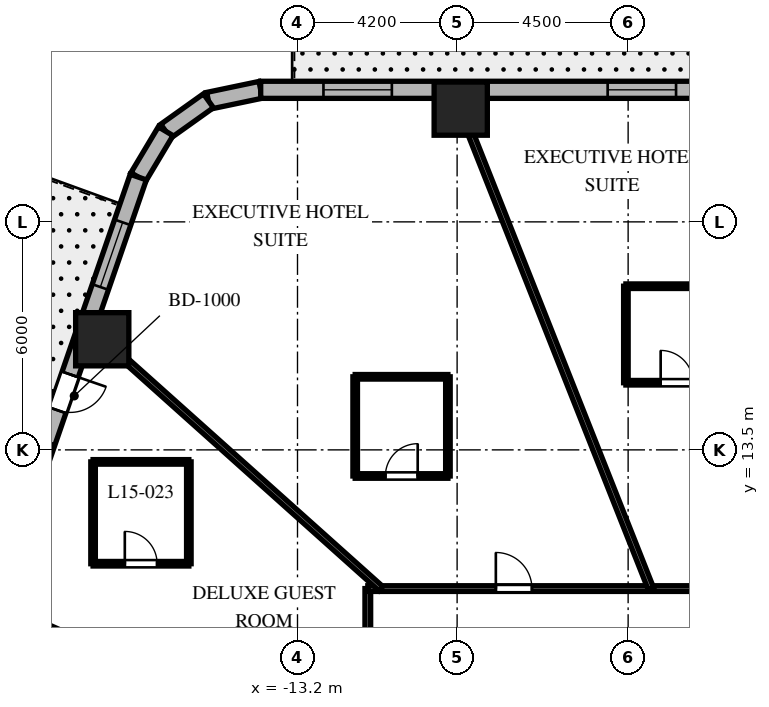
"""IFC4 building model, lengths in metres.
Left out: names, types, materials, properties, quantities, classifications, styles, units other than length and angle.
Written with IfcOpenShell. Run it as: python <this file> out.ifc"""

import sys

from ifc_helpers import new_model, si_unit, direction, frame, frame_2d, origin, origin_2d, place, context, subcontext, project, spatial, rectangle, extrude, element, fill, save


model = new_model("IFC4")
c1 = context("Model", 3, precision=1e-05, world=origin(), true_north=direction((0.0, 1.0)))
c2 = subcontext(c1, "Body", "Model", "MODEL_VIEW")
j1 = project(units=[si_unit("LENGTHUNIT", "METRE"), si_unit("PLANEANGLEUNIT", "RADIAN")], contexts=[c1])
p1 = place(None, origin())
s1 = spatial("IfcSite", under=j1, at=p1, CompositionType="ELEMENT")
p2 = place(p1, origin())
s2 = spatial("IfcBuilding", under=s1, at=p2, CompositionType="ELEMENT")
p3 = place(p2, frame((0.0, 0.0, 67.5)))
s3 = spatial("IfcBuildingStorey", under=s2, at=p3, CompositionType="ELEMENT", Elevation=67.5)
for number, where, z_axis, x_axis in (
    (1, (-8.905, 22.48, 0.0), (0.0, 0.0, 1.0), (1.0, 0.0, 0.0)),
    (2, (-18.338, 16.411, 0.0), (0.0, 0.0, 1.0), (1.0, 0.0, 0.0)),
):
    element("IfcColumn", number, at=place(p3, frame(where, z_axis=z_axis, x_axis=x_axis)), inside=s3, PredefinedType="COLUMN", context=c2, shape_type="SweptSolid", body=[
        extrude(rectangle(XDim=1.4, YDim=1.4, at=origin_2d()), origin(), (0.0, 0.0, 1.0), 3.7),
    ])
p4 = place(p3, frame((-14.168, 22.975, 0.0), z_axis=(0.0, 0.0, 1.0), x_axis=(-0.978770371074, -0.204959900243, 0.0)))
e3 = element("IfcWall", 3, at=p4, inside=s3, PredefinedType="SOLIDWALL", context=c2, shape_type="SweptSolid", body=[
    extrude(rectangle(XDim=1.406, YDim=0.45, at=frame_2d((0.703, 0.0))), origin(), (0.0, 0.0, 1.0), 3.4),
])
p5 = place(p3, frame((-15.544, 22.687, 0.0), z_axis=(0.0, 0.0, 1.0), x_axis=(-0.814210854316, -0.580569276412, 0.0)))
e4 = element("IfcWall", 4, at=p5, inside=s3, PredefinedType="SOLIDWALL", context=c2, shape_type="SweptSolid", body=[
    extrude(rectangle(XDim=1.381, YDim=0.45, at=frame_2d((0.691, 0.0))), origin(), (0.0, 0.0, 1.0), 3.4),
])
p6 = place(p3, frame((-16.669, 21.885, 0.0), z_axis=(0.0, 0.0, 1.0), x_axis=(-0.512936712947, -0.858426425799, 0.0)))
e5 = element("IfcWall", 5, at=p6, inside=s3, PredefinedType="SOLIDWALL", context=c2, shape_type="SweptSolid", body=[
    extrude(rectangle(XDim=1.406, YDim=0.45, at=frame_2d((0.703, 0.0))), origin(), (0.0, 0.0, 1.0), 3.4),
])
p7 = place(p3, frame((12.221, 22.975, 0.0), z_axis=(0.0, 0.0, 1.0), x_axis=(-1.0, 0.0, 0.0)))
e6 = element("IfcWall", 6, at=p7, inside=s3, PredefinedType="SOLIDWALL", context=c2, shape_type="SweptSolid", body=[
    extrude(rectangle(XDim=26.389, YDim=0.45, at=frame_2d((13.195, 0.0))), origin(), (0.0, 0.0, 1.0), 3.4),
])
p8 = place(p7, frame((2.799, 0.0, 0.0)))
e7 = element("IfcOpeningElement", 7, at=p8, cuts=e6, PredefinedType="OPENING", context=c2, shape_type="SweptSolid", body=[
    extrude(rectangle(XDim=0.95, YDim=2.15, at=frame_2d((0.475, 1.075))), frame((0.0, 0.235, 0.0), z_axis=(0.0, -1.0, 0.0), x_axis=(1.0, 0.0, 0.0)), (0.0, 0.0, 1.0), 0.47),
])
p9 = place(p7, frame((8.11, 0.0, 0.8)))
e8 = element("IfcOpeningElement", 8, at=p9, cuts=e6, PredefinedType="OPENING", context=c2, shape_type="SweptSolid", body=[
    extrude(rectangle(XDim=1.8, YDim=1.8, at=frame_2d((0.9, 0.9))), frame((0.0, 0.235, 0.0), z_axis=(0.0, -1.0, 0.0), x_axis=(1.0, 0.0, 0.0)), (0.0, 0.0, 1.0), 0.47),
])
p10 = place(p7, frame((15.46, 0.0, 0.8)))
e9 = element("IfcOpeningElement", 9, at=p10, cuts=e6, PredefinedType="OPENING", context=c2, shape_type="SweptSolid", body=[
    extrude(rectangle(XDim=1.8, YDim=1.8, at=frame_2d((0.9, 0.9))), frame((0.0, 0.235, 0.0), z_axis=(0.0, -1.0, 0.0), x_axis=(1.0, 0.0, 0.0)), (0.0, 0.0, 1.0), 0.47),
])
p11 = place(p7, frame((22.938, 0.0, 0.8)))
e10 = element("IfcOpeningElement", 10, at=p11, cuts=e6, PredefinedType="OPENING", context=c2, shape_type="SweptSolid", body=[
    extrude(rectangle(XDim=1.8, YDim=1.8, at=frame_2d((0.9, 0.9))), frame((0.0, 0.235, 0.0), z_axis=(0.0, -1.0, 0.0), x_axis=(1.0, 0.0, 0.0)), (0.0, 0.0, 1.0), 0.47),
])
p12 = place(p3, frame((-17.39, 20.678, 0.0), z_axis=(0.0, 0.0, 1.0), x_axis=(-0.326068018294, -0.945346310854, 0.0)))
e11 = element("IfcWall", 11, at=p12, inside=s3, PredefinedType="SOLIDWALL", context=c2, shape_type="SweptSolid", body=[
    extrude(rectangle(XDim=21.793, YDim=0.45, at=frame_2d((10.896, 0.0))), origin(), (0.0, 0.0, 1.0), 3.4),
])
p13 = place(p12, frame((5.493, 0.0, 0.0)))
e12 = element("IfcOpeningElement", 12, at=p13, cuts=e11, PredefinedType="OPENING", context=c2, shape_type="SweptSolid", body=[
    extrude(rectangle(XDim=1.0, YDim=2.15, at=frame_2d((0.5, 1.075))), frame((0.0, 0.235, 0.0), z_axis=(0.0, -1.0, 0.0), x_axis=(1.0, 0.0, 0.0)), (0.0, 0.0, 1.0), 0.47),
])
p14 = place(p12, frame((1.26, 0.0, 0.8)))
e13 = element("IfcOpeningElement", 13, at=p14, cuts=e11, PredefinedType="OPENING", context=c2, shape_type="SweptSolid", body=[
    extrude(rectangle(XDim=1.8, YDim=1.8, at=frame_2d((0.9, 0.9))), frame((0.0, 0.235, 0.0), z_axis=(0.0, -1.0, 0.0), x_axis=(1.0, 0.0, 0.0)), (0.0, 0.0, 1.0), 0.47),
])
p15 = place(p12, frame((7.363, 0.0, 0.8)))
e14 = element("IfcOpeningElement", 14, at=p15, cuts=e11, PredefinedType="OPENING", context=c2, shape_type="SweptSolid", body=[
    extrude(rectangle(XDim=1.8, YDim=1.8, at=frame_2d((0.9, 0.9))), frame((0.0, 0.235, 0.0), z_axis=(0.0, -1.0, 0.0), x_axis=(1.0, 0.0, 0.0)), (0.0, 0.0, 1.0), 0.47),
])
p16 = place(p12, frame((13.518, 0.0, 0.8)))
e15 = element("IfcOpeningElement", 15, at=p16, cuts=e11, PredefinedType="OPENING", context=c2, shape_type="SweptSolid", body=[
    extrude(rectangle(XDim=1.8, YDim=1.8, at=frame_2d((0.9, 0.9))), frame((0.0, 0.235, 0.0), z_axis=(0.0, -1.0, 0.0), x_axis=(1.0, 0.0, 0.0)), (0.0, 0.0, 1.0), 0.47),
])
p17 = place(p12, frame((18.68, 0.0, 0.8)))
e16 = element("IfcOpeningElement", 16, at=p17, cuts=e11, PredefinedType="OPENING", context=c2, shape_type="SweptSolid", body=[
    extrude(rectangle(XDim=1.8, YDim=1.8, at=frame_2d((0.9, 0.9))), frame((0.0, 0.235, 0.0), z_axis=(0.0, -1.0, 0.0), x_axis=(1.0, 0.0, 0.0)), (0.0, 0.0, 1.0), 0.47),
])
p18 = place(p3, frame((-11.35, -9.85, 0.0), z_axis=(0.0, 0.0, 1.0), x_axis=(0.0, 1.0, 0.0)))
e17 = element("IfcWall", 17, at=p18, inside=s3, PredefinedType="PARTITIONING", context=c2, shape_type="SweptSolid", body=[
    extrude(rectangle(XDim=19.7, YDim=0.15, at=frame_2d((9.85, 0.0))), origin(), (0.0, 0.0, 1.0), 2.84),
])
p19 = place(p18, frame((16.714, 0.0, 0.0)))
e18 = element("IfcOpeningElement", 18, at=p19, cuts=e17, PredefinedType="OPENING", context=c2, shape_type="SweptSolid", body=[
    extrude(rectangle(XDim=0.95, YDim=2.03, at=frame_2d((0.475, 1.015))), frame((0.0, 0.085, 0.0), z_axis=(0.0, -1.0, 0.0), x_axis=(1.0, 0.0, 0.0)), (0.0, 0.0, 1.0), 0.17),
])
p20 = place(p18, frame((12.932, 0.0, 0.0)))
e19 = element("IfcOpeningElement", 19, at=p20, cuts=e17, PredefinedType="OPENING", context=c2, shape_type="SweptSolid", body=[
    extrude(rectangle(XDim=0.95, YDim=2.03, at=frame_2d((0.475, 1.015))), frame((0.0, 0.085, 0.0), z_axis=(0.0, -1.0, 0.0), x_axis=(1.0, 0.0, 0.0)), (0.0, 0.0, 1.0), 0.17),
])
p21 = place(p18, frame((8.838, 0.0, 0.0)))
e20 = element("IfcOpeningElement", 20, at=p21, cuts=e17, PredefinedType="OPENING", context=c2, shape_type="SweptSolid", body=[
    extrude(rectangle(XDim=0.95, YDim=2.03, at=frame_2d((0.475, 1.015))), frame((0.0, 0.085, 0.0), z_axis=(0.0, -1.0, 0.0), x_axis=(1.0, 0.0, 0.0)), (0.0, 0.0, 1.0), 0.17),
])
p22 = place(p18, frame((3.024, 0.0, 0.0)))
e21 = element("IfcOpeningElement", 21, at=p22, cuts=e17, PredefinedType="OPENING", context=c2, shape_type="SweptSolid", body=[
    extrude(rectangle(XDim=0.95, YDim=2.03, at=frame_2d((0.475, 1.015))), frame((0.0, 0.085, 0.0), z_axis=(0.0, -1.0, 0.0), x_axis=(1.0, 0.0, 0.0)), (0.0, 0.0, 1.0), 0.17),
])
p23 = place(p3, frame((-11.35, 9.85, 0.0), z_axis=(0.0, 0.0, 1.0), x_axis=(1.0, 0.0, 0.0)))
e22 = element("IfcWall", 22, at=p23, inside=s3, PredefinedType="PARTITIONING", context=c2, shape_type="SweptSolid", body=[
    extrude(rectangle(XDim=22.7, YDim=0.15, at=frame_2d((11.35, 0.0))), origin(), (0.0, 0.0, 1.0), 2.84),
])
p24 = place(p23, frame((17.225, 0.0, 0.0)))
e23 = element("IfcOpeningElement", 23, at=p24, cuts=e22, PredefinedType="OPENING", context=c2, shape_type="SweptSolid", body=[
    extrude(rectangle(XDim=0.95, YDim=2.03, at=frame_2d((0.475, 1.015))), frame((0.0, 0.085, 0.0), z_axis=(0.0, -1.0, 0.0), x_axis=(1.0, 0.0, 0.0)), (0.0, 0.0, 1.0), 0.17),
])
p25 = place(p23, frame((12.415, 0.0, 0.0)))
e24 = element("IfcOpeningElement", 24, at=p25, cuts=e22, PredefinedType="OPENING", context=c2, shape_type="SweptSolid", body=[
    extrude(rectangle(XDim=0.95, YDim=2.03, at=frame_2d((0.475, 1.015))), frame((0.0, 0.085, 0.0), z_axis=(0.0, -1.0, 0.0), x_axis=(1.0, 0.0, 0.0)), (0.0, 0.0, 1.0), 0.17),
])
p26 = place(p23, frame((8.925, 0.0, 0.0)))
e25 = element("IfcOpeningElement", 25, at=p26, cuts=e22, PredefinedType="OPENING", context=c2, shape_type="SweptSolid", body=[
    extrude(rectangle(XDim=0.95, YDim=2.03, at=frame_2d((0.475, 1.015))), frame((0.0, 0.085, 0.0), z_axis=(0.0, -1.0, 0.0), x_axis=(1.0, 0.0, 0.0)), (0.0, 0.0, 1.0), 0.17),
])
p27 = place(p23, frame((3.369, 0.0, 0.0)))
e26 = element("IfcOpeningElement", 26, at=p27, cuts=e22, PredefinedType="OPENING", context=c2, shape_type="SweptSolid", body=[
    extrude(rectangle(XDim=0.95, YDim=2.03, at=frame_2d((0.475, 1.015))), frame((0.0, 0.085, 0.0), z_axis=(0.0, -1.0, 0.0), x_axis=(1.0, 0.0, 0.0)), (0.0, 0.0, 1.0), 0.17),
])
p28 = place(p3, frame((-3.902, 9.85, 0.0), z_axis=(0.0, 0.0, 1.0), x_axis=(-0.36828765711, 0.929711891728, 0.0)))
e27 = element("IfcWall", 27, at=p28, inside=s3, PredefinedType="PARTITIONING", context=c2, shape_type="SweptSolid", body=[
    extrude(rectangle(XDim=14.117, YDim=0.15, at=frame_2d((7.059, 0.0))), origin(), (0.0, 0.0, 1.0), 2.54),
])
p29 = place(p3, frame((-11.007, 9.85, 0.0), z_axis=(0.0, 0.0, 1.0), x_axis=(-0.745177305978, 0.666866390407, 0.0)))
e28 = element("IfcWall", 28, at=p29, inside=s3, PredefinedType="PARTITIONING", context=c2, shape_type="SweptSolid", body=[
    extrude(rectangle(XDim=10.375, YDim=0.15, at=frame_2d((5.188, 0.0))), origin(), (0.0, 0.0, 1.0), 2.54),
])
p30 = place(p3, frame((-11.35, 5.068, 0.0), z_axis=(0.0, 0.0, 1.0), x_axis=(-0.913107192911, 0.407719577963, 0.0)))
e29 = element("IfcWall", 29, at=p30, inside=s3, PredefinedType="PARTITIONING", context=c2, shape_type="SweptSolid", body=[
    extrude(rectangle(XDim=10.841, YDim=0.15, at=frame_2d((5.421, 0.0))), origin(), (0.0, 0.0, 1.0), 2.54),
])
p31 = place(p3, frame((-4.559, 15.267, 0.0), z_axis=(0.0, 0.0, 1.0), x_axis=(1.0, 0.0, 0.0)))
e30 = element("IfcWall", 30, at=p31, inside=s3, PredefinedType="PARTITIONING", context=c2, shape_type="SweptSolid", body=[
    extrude(rectangle(XDim=2.68, YDim=0.12, at=frame_2d((1.34, 0.0))), origin(), (0.0, 0.0, 1.0), 3.4),
])
p32 = place(p31, frame((0.915, 0.0, 0.0)))
e31 = element("IfcOpeningElement", 31, at=p32, cuts=e30, PredefinedType="OPENING", context=c2, shape_type="SweptSolid", body=[
    extrude(rectangle(XDim=0.85, YDim=2.03, at=frame_2d((0.425, 1.015))), frame((0.0, 0.07, 0.0), z_axis=(0.0, -1.0, 0.0), x_axis=(1.0, 0.0, 0.0)), (0.0, 0.0, 1.0), 0.14),
])
p33 = place(p3, frame((-1.879, 17.807, 0.0), z_axis=(0.0, 0.0, 1.0), x_axis=(-1.0, 0.0, 0.0)))
e32 = element("IfcWall", 32, at=p33, inside=s3, PredefinedType="PARTITIONING", context=c2, shape_type="SweptSolid", body=[
    extrude(rectangle(XDim=2.68, YDim=0.12, at=frame_2d((1.34, 0.0))), origin(), (0.0, 0.0, 1.0), 2.84),
])
p34 = place(p3, frame((-4.559, 17.807, 0.0), z_axis=(0.0, 0.0, 1.0), x_axis=(0.0, -1.0, 0.0)))
e33 = element("IfcWall", 33, at=p34, inside=s3, PredefinedType="PARTITIONING", context=c2, shape_type="SweptSolid", body=[
    extrude(rectangle(XDim=2.54, YDim=0.12, at=frame_2d((1.27, 0.0))), origin(), (0.0, 0.0, 1.0), 2.84),
])
p35 = place(p3, frame((-11.682, 12.813, 0.0), z_axis=(0.0, 0.0, 1.0), x_axis=(1.0, 0.0, 0.0)))
e34 = element("IfcWall", 34, at=p35, inside=s3, PredefinedType="PARTITIONING", context=c2, shape_type="SweptSolid", body=[
    extrude(rectangle(XDim=2.44, YDim=0.12, at=frame_2d((1.22, 0.0))), origin(), (0.0, 0.0, 1.0), 2.972),
])
p36 = place(p35, frame((0.795, 0.0, 0.0)))
e35 = element("IfcOpeningElement", 35, at=p36, cuts=e34, PredefinedType="OPENING", context=c2, shape_type="SweptSolid", body=[
    extrude(rectangle(XDim=0.85, YDim=2.03, at=frame_2d((0.425, 1.015))), frame((0.0, 0.07, 0.0), z_axis=(0.0, -1.0, 0.0), x_axis=(1.0, 0.0, 0.0)), (0.0, 0.0, 1.0), 0.14),
])
p37 = place(p3, frame((-9.242, 12.813, 0.0), z_axis=(0.0, 0.0, 1.0), x_axis=(0.0, 1.0, 0.0)))
e36 = element("IfcWall", 36, at=p37, inside=s3, PredefinedType="PARTITIONING", context=c2, shape_type="SweptSolid", body=[
    extrude(rectangle(XDim=2.61, YDim=0.12, at=frame_2d((1.305, 0.0))), origin(), (0.0, 0.0, 1.0), 2.972),
])
p38 = place(p3, frame((-9.242, 15.423, 0.0), z_axis=(0.0, 0.0, 1.0), x_axis=(-1.0, 0.0, 0.0)))
e37 = element("IfcWall", 37, at=p38, inside=s3, PredefinedType="PARTITIONING", context=c2, shape_type="SweptSolid", body=[
    extrude(rectangle(XDim=2.44, YDim=0.12, at=frame_2d((1.22, 0.0))), origin(), (0.0, 0.0, 1.0), 3.4),
])
p39 = place(p3, frame((-11.682, 15.423, 0.0), z_axis=(0.0, 0.0, 1.0), x_axis=(0.0, -1.0, 0.0)))
e38 = element("IfcWall", 38, at=p39, inside=s3, PredefinedType="PARTITIONING", context=c2, shape_type="SweptSolid", body=[
    extrude(rectangle(XDim=2.61, YDim=0.12, at=frame_2d((1.305, 0.0))), origin(), (0.0, 0.0, 1.0), 3.4),
])
p40 = place(p3, frame((-18.579, 10.504, 0.0), z_axis=(0.0, 0.0, 1.0), x_axis=(1.0, 0.0, 0.0)))
e39 = element("IfcWall", 39, at=p40, inside=s3, PredefinedType="PARTITIONING", context=c2, shape_type="SweptSolid", body=[
    extrude(rectangle(XDim=2.52, YDim=0.12, at=frame_2d((1.26, 0.0))), origin(), (0.0, 0.0, 1.0), 2.972),
])
p41 = place(p40, frame((0.835, 0.0, 0.0)))
e40 = element("IfcOpeningElement", 40, at=p41, cuts=e39, PredefinedType="OPENING", context=c2, shape_type="SweptSolid", body=[
    extrude(rectangle(XDim=0.85, YDim=2.03, at=frame_2d((0.425, 1.015))), frame((0.0, 0.07, 0.0), z_axis=(0.0, -1.0, 0.0), x_axis=(1.0, 0.0, 0.0)), (0.0, 0.0, 1.0), 0.14),
])
p42 = place(p3, frame((-16.059, 10.504, 0.0), z_axis=(0.0, 0.0, 1.0), x_axis=(0.0, 1.0, 0.0)))
e41 = element("IfcWall", 41, at=p42, inside=s3, PredefinedType="PARTITIONING", context=c2, shape_type="SweptSolid", body=[
    extrude(rectangle(XDim=2.68, YDim=0.12, at=frame_2d((1.34, 0.0))), origin(), (0.0, 0.0, 1.0), 2.972),
])
p43 = place(p3, frame((-16.059, 13.184, 0.0), z_axis=(0.0, 0.0, 1.0), x_axis=(-1.0, 0.0, 0.0)))
e42 = element("IfcWall", 42, at=p43, inside=s3, PredefinedType="PARTITIONING", context=c2, shape_type="SweptSolid", body=[
    extrude(rectangle(XDim=2.52, YDim=0.12, at=frame_2d((1.26, 0.0))), origin(), (0.0, 0.0, 1.0), 3.4),
])
p44 = place(p3, frame((-18.579, 13.184, 0.0), z_axis=(0.0, 0.0, 1.0), x_axis=(0.0, -1.0, 0.0)))
e43 = element("IfcWall", 43, at=p44, inside=s3, PredefinedType="PARTITIONING", context=c2, shape_type="SweptSolid", body=[
    extrude(rectangle(XDim=2.68, YDim=0.12, at=frame_2d((1.34, 0.0))), origin(), (0.0, 0.0, 1.0), 3.4),
])
p45 = place(p10, origin())
e44 = element("IfcWindow", 44, at=p45, inside=s3, PartitioningType="SINGLE_PANEL", PredefinedType="WINDOW", context=c2, shape_type="SweptSolid", body=[
    extrude(rectangle(XDim=1.8, YDim=1.8, at=frame_2d((0.9, 0.9))), frame((0.0, 0.03, 0.0), z_axis=(0.0, -1.0, 0.0), x_axis=(1.0, 0.0, 0.0)), (0.0, 0.0, 1.0), 0.06),
])
fill(e9, e44)
p46 = place(p11, origin())
e45 = element("IfcWindow", 45, at=p46, inside=s3, PartitioningType="SINGLE_PANEL", PredefinedType="WINDOW", context=c2, shape_type="SweptSolid", body=[
    extrude(rectangle(XDim=1.8, YDim=1.8, at=frame_2d((0.9, 0.9))), frame((0.0, 0.03, 0.0), z_axis=(0.0, -1.0, 0.0), x_axis=(1.0, 0.0, 0.0)), (0.0, 0.0, 1.0), 0.06),
])
fill(e10, e45)
p47 = place(p13, origin())
e46 = element("IfcDoor", 46, at=p47, inside=s3, OperationType="SINGLE_SWING_LEFT", PredefinedType="DOOR", context=c2, shape_type="SweptSolid", body=[
    extrude(rectangle(XDim=1.0, YDim=2.15, at=frame_2d((0.5, 1.075))), frame((0.0, 0.025, 0.0), z_axis=(0.0, -1.0, 0.0), x_axis=(1.0, 0.0, 0.0)), (0.0, 0.0, 1.0), 0.05),
])
fill(e12, e46)
p48 = place(p14, origin())
e47 = element("IfcWindow", 47, at=p48, inside=s3, PartitioningType="SINGLE_PANEL", PredefinedType="WINDOW", context=c2, shape_type="SweptSolid", body=[
    extrude(rectangle(XDim=1.8, YDim=1.8, at=frame_2d((0.9, 0.9))), frame((0.0, 0.03, 0.0), z_axis=(0.0, -1.0, 0.0), x_axis=(1.0, 0.0, 0.0)), (0.0, 0.0, 1.0), 0.06),
])
fill(e13, e47)
p49 = place(p32, origin())
e48 = element("IfcDoor", 48, at=p49, inside=s3, OperationType="SINGLE_SWING_LEFT", PredefinedType="DOOR", context=c2, shape_type="SweptSolid", body=[
    extrude(rectangle(XDim=0.85, YDim=2.03, at=frame_2d((0.425, 1.015))), frame((0.0, 0.025, 0.0), z_axis=(0.0, -1.0, 0.0), x_axis=(1.0, 0.0, 0.0)), (0.0, 0.0, 1.0), 0.05),
])
fill(e31, e48)
p50 = place(p27, origin())
e49 = element("IfcDoor", 49, at=p50, inside=s3, OperationType="SINGLE_SWING_LEFT", PredefinedType="DOOR", context=c2, shape_type="SweptSolid", body=[
    extrude(rectangle(XDim=0.95, YDim=2.03, at=frame_2d((0.475, 1.015))), frame((0.0, 0.025, 0.0), z_axis=(0.0, -1.0, 0.0), x_axis=(1.0, 0.0, 0.0)), (0.0, 0.0, 1.0), 0.05),
])
fill(e26, e49)
p51 = place(p36, origin())
e50 = element("IfcDoor", 50, at=p51, inside=s3, OperationType="SINGLE_SWING_RIGHT", PredefinedType="DOOR", context=c2, shape_type="SweptSolid", body=[
    extrude(rectangle(XDim=0.85, YDim=2.03, at=frame_2d((0.425, 1.015))), frame((0.0, 0.025, 0.0), z_axis=(0.0, -1.0, 0.0), x_axis=(1.0, 0.0, 0.0)), (0.0, 0.0, 1.0), 0.05),
])
fill(e35, e50)
p52 = place(p41, origin())
e51 = element("IfcDoor", 51, at=p52, inside=s3, OperationType="SINGLE_SWING_LEFT", PredefinedType="DOOR", context=c2, shape_type="SweptSolid", body=[
    extrude(rectangle(XDim=0.85, YDim=2.03, at=frame_2d((0.425, 1.015))), frame((0.0, 0.025, 0.0), z_axis=(0.0, -1.0, 0.0), x_axis=(1.0, 0.0, 0.0)), (0.0, 0.0, 1.0), 0.05),
])
fill(e40, e51)
save(model, sys.argv[1])
